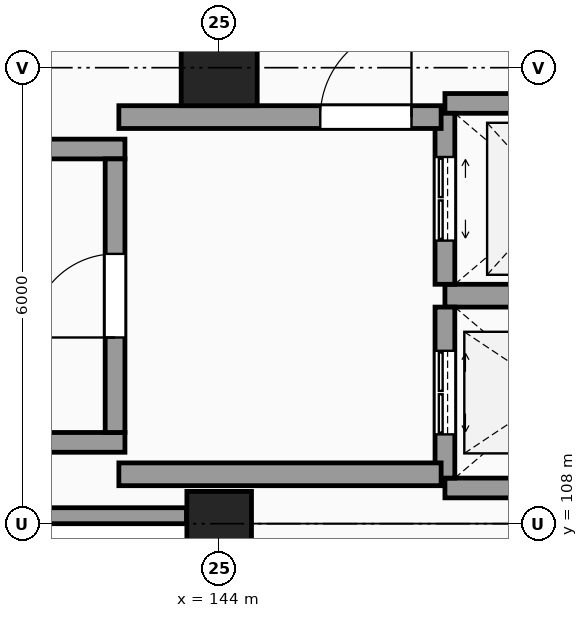
"""IFC4 building model, lengths in metres.
Left out: names, types, materials, properties, quantities, classifications, styles, units other than length and angle.
Written with IfcOpenShell. Run it as: python <this file> out.ifc"""

import sys

from ifc_helpers import new_model, si_unit, direction, frame, frame_2d, origin, origin_2d, place, context, subcontext, project, spatial, rectangle, circle, extrude, element, fill, save


model = new_model("IFC4")
c1 = context("Model", 3, precision=1e-05, world=origin(), true_north=direction((0.0, 1.0)))
c2 = subcontext(c1, "Body", "Model", "MODEL_VIEW")
j1 = project(units=[si_unit("LENGTHUNIT", "METRE"), si_unit("PLANEANGLEUNIT", "RADIAN")], contexts=[c1])
p1 = place(None, origin())
s1 = spatial("IfcSite", under=j1, at=p1, CompositionType="ELEMENT")
p2 = place(p1, origin())
s2 = spatial("IfcBuilding", under=s1, at=p2, CompositionType="ELEMENT")
p3 = place(p2, origin())
s3 = spatial("IfcBuildingStorey", under=s2, at=p3, CompositionType="ELEMENT", Elevation=0.0)
p4 = place(p3, frame((144.0, 108.0, 0.0), z_axis=(0.0, 0.0, 1.0), x_axis=(1.0, 0.0, 0.0)))
e1 = element("IfcColumn", 1, at=p4, inside=s3, PredefinedType="COLUMN", context=c2, shape_type="SweptSolid", body=[
    extrude(circle(Radius=0.425, at=origin_2d()), origin(), (0.0, 0.0, 1.0), 6.0),
])
p5 = place(p3, frame((144.0, 114.0, 0.0), z_axis=(0.0, 0.0, 1.0), x_axis=(1.0, 0.0, 0.0)))
e2 = element("IfcColumn", 2, at=p5, inside=s3, PredefinedType="COLUMN", context=c2, shape_type="SweptSolid", body=[
    extrude(circle(Radius=0.5, at=origin_2d()), origin(), (0.0, 0.0, 1.0), 6.0),
])
p6 = place(p3, frame((138.38, 108.105, 0.0), z_axis=(0.0, 0.0, 1.0), x_axis=(1.0, 0.0, 0.0)))
e3 = element("IfcWall", 3, at=p6, inside=s3, PredefinedType="SOLIDWALL", context=c2, shape_type="SweptSolid", body=[
    extrude(rectangle(XDim=5.19, YDim=0.21, at=frame_2d((2.595, 0.0))), origin(), (0.0, 0.0, 1.0), 4.99),
])
for number, where, z_axis, x_axis in (
    (4, (132.04, 109.07, 0.0), (0.0, 0.0, 1.0), (1.0, 0.0, 0.0)),
    (5, (132.04, 112.93, 0.0), (0.0, 0.0, 1.0), (1.0, 0.0, 0.0)),
):
    element("IfcWall", number, at=place(p3, frame(where, z_axis=z_axis, x_axis=x_axis)), inside=s3, PredefinedType="SHEAR", context=c2, shape_type="SweptSolid", body=[
        extrude(rectangle(XDim=10.72, YDim=0.26, at=frame_2d((5.36, 0.0))), origin(), (0.0, 0.0, 1.0), 6.0),
    ])
p7 = place(p3, frame((142.63, 109.2, 0.0), z_axis=(0.0, 0.0, 1.0), x_axis=(0.0, 1.0, 0.0)))
e6 = element("IfcWall", 6, at=p7, inside=s3, PredefinedType="SHEAR", context=c2, shape_type="SweptSolid", body=[
    extrude(rectangle(XDim=3.6, YDim=0.26, at=frame_2d((1.8, 0.0))), origin(), (0.0, 0.0, 1.0), 6.0),
])
p8 = place(p7, frame((1.25, 0.0, 0.0)))
e7 = element("IfcOpeningElement", 7, at=p8, cuts=e6, PredefinedType="OPENING", context=c2, shape_type="SweptSolid", body=[
    extrude(rectangle(XDim=1.1, YDim=2.15, at=frame_2d((0.55, 1.075))), frame((0.0, 0.14, 0.0), z_axis=(0.0, -1.0, 0.0), x_axis=(1.0, 0.0, 0.0)), (0.0, 0.0, 1.0), 0.28),
])
p9 = place(p3, frame((146.97, 108.47, 0.0), z_axis=(0.0, 0.0, 1.0), x_axis=(1.0, 0.0, 0.0)))
e8 = element("IfcWall", 8, at=p9, inside=s3, PredefinedType="SHEAR", context=c2, shape_type="SweptSolid", body=[
    extrude(rectangle(XDim=2.91, YDim=0.26, at=frame_2d((1.455, 0.0))), origin(), (0.0, 0.0, 1.0), 6.0),
])
p10 = place(p3, frame((146.97, 111.0, 0.0), z_axis=(0.0, 0.0, 1.0), x_axis=(1.0, 0.0, 0.0)))
e9 = element("IfcWall", 9, at=p10, inside=s3, PredefinedType="SHEAR", context=c2, shape_type="SweptSolid", body=[
    extrude(rectangle(XDim=2.91, YDim=0.3, at=frame_2d((1.455, 0.0))), origin(), (0.0, 0.0, 1.0), 6.0),
])
p11 = place(p3, frame((146.97, 108.6, 0.0), z_axis=(0.0, 0.0, 1.0), x_axis=(0.0, 1.0, 0.0)))
e10 = element("IfcWall", 10, at=p11, inside=s3, PredefinedType="SHEAR", context=c2, shape_type="SweptSolid", body=[
    extrude(rectangle(XDim=2.25, YDim=0.26, at=frame_2d((1.125, 0.0))), origin(), (0.0, 0.0, 1.0), 6.0),
])
p12 = place(p11, frame((0.575, 0.0, 0.0)))
e11 = element("IfcOpeningElement", 11, at=p12, cuts=e10, PredefinedType="OPENING", context=c2, shape_type="SweptSolid", body=[
    extrude(rectangle(XDim=1.1, YDim=2.2, at=frame_2d((0.55, 1.1))), frame((0.0, 0.14, 0.0), z_axis=(0.0, -1.0, 0.0), x_axis=(1.0, 0.0, 0.0)), (0.0, 0.0, 1.0), 0.28),
])
p13 = place(p3, frame((146.97, 113.53, 0.0), z_axis=(0.0, 0.0, 1.0), x_axis=(1.0, 0.0, 0.0)))
e12 = element("IfcWall", 12, at=p13, inside=s3, PredefinedType="SHEAR", context=c2, shape_type="SweptSolid", body=[
    extrude(rectangle(XDim=2.91, YDim=0.26, at=frame_2d((1.455, 0.0))), origin(), (0.0, 0.0, 1.0), 6.0),
])
p14 = place(p3, frame((146.97, 111.15, 0.0), z_axis=(0.0, 0.0, 1.0), x_axis=(0.0, 1.0, 0.0)))
e13 = element("IfcWall", 13, at=p14, inside=s3, PredefinedType="SHEAR", context=c2, shape_type="SweptSolid", body=[
    extrude(rectangle(XDim=2.25, YDim=0.26, at=frame_2d((1.125, 0.0))), origin(), (0.0, 0.0, 1.0), 6.0),
])
p15 = place(p14, frame((0.575, 0.0, 0.0)))
e14 = element("IfcOpeningElement", 14, at=p15, cuts=e13, PredefinedType="OPENING", context=c2, shape_type="SweptSolid", body=[
    extrude(rectangle(XDim=1.1, YDim=2.2, at=frame_2d((0.55, 1.1))), frame((0.0, 0.14, 0.0), z_axis=(0.0, -1.0, 0.0), x_axis=(1.0, 0.0, 0.0)), (0.0, 0.0, 1.0), 0.28),
])
p16 = place(p3, frame((142.68, 113.35, 0.0), z_axis=(0.0, 0.0, 1.0), x_axis=(1.0, 0.0, 0.0)))
e15 = element("IfcWall", 15, at=p16, inside=s3, PredefinedType="SHEAR", context=c2, shape_type="SweptSolid", body=[
    extrude(rectangle(XDim=4.24, YDim=0.3, at=frame_2d((2.12, 0.0))), origin(), (0.0, 0.0, 1.0), 6.0),
])
p17 = place(p16, frame((2.65, 0.0, 0.0)))
e16 = element("IfcOpeningElement", 16, at=p17, cuts=e15, PredefinedType="OPENING", context=c2, shape_type="SweptSolid", body=[
    extrude(rectangle(XDim=1.2, YDim=2.2, at=frame_2d((0.6, 1.1))), frame((0.0, 0.16, 0.0), z_axis=(0.0, -1.0, 0.0), x_axis=(1.0, 0.0, 0.0)), (0.0, 0.0, 1.0), 0.32),
])
p18 = place(p3, frame((142.68, 108.65, 0.0), z_axis=(0.0, 0.0, 1.0), x_axis=(1.0, 0.0, 0.0)))
e17 = element("IfcWall", 17, at=p18, inside=s3, PredefinedType="SHEAR", context=c2, shape_type="SweptSolid", body=[
    extrude(rectangle(XDim=4.24, YDim=0.3, at=frame_2d((2.12, 0.0))), origin(), (0.0, 0.0, 1.0), 6.0),
])
p19 = place(p8, origin())
e18 = element("IfcDoor", 18, at=p19, inside=s3, OperationType="SINGLE_SWING_LEFT", PredefinedType="DOOR", context=c2, shape_type="SweptSolid", body=[
    extrude(rectangle(XDim=1.1, YDim=2.15, at=frame_2d((0.55, 1.075))), frame((0.0, 0.025, 0.0), z_axis=(0.0, -1.0, 0.0), x_axis=(1.0, 0.0, 0.0)), (0.0, 0.0, 1.0), 0.05),
])
fill(e7, e18)
p20 = place(p12, origin())
e19 = element("IfcDoor", 19, at=p20, inside=s3, OperationType="DOUBLE_DOOR_SLIDING", PredefinedType="DOOR", context=c2, shape_type="SweptSolid", body=[
    extrude(rectangle(XDim=1.1, YDim=2.2, at=frame_2d((0.55, 1.1))), frame((0.0, 0.025, 0.0), z_axis=(0.0, -1.0, 0.0), x_axis=(1.0, 0.0, 0.0)), (0.0, 0.0, 1.0), 0.05),
])
fill(e11, e19)
p21 = place(p15, origin())
e20 = element("IfcDoor", 20, at=p21, inside=s3, OperationType="DOUBLE_DOOR_SLIDING", PredefinedType="DOOR", context=c2, shape_type="SweptSolid", body=[
    extrude(rectangle(XDim=1.1, YDim=2.2, at=frame_2d((0.55, 1.1))), frame((0.0, 0.025, 0.0), z_axis=(0.0, -1.0, 0.0), x_axis=(1.0, 0.0, 0.0)), (0.0, 0.0, 1.0), 0.05),
])
fill(e14, e20)
p22 = place(p17, origin())
e21 = element("IfcDoor", 21, at=p22, inside=s3, OperationType="SINGLE_SWING_RIGHT", PredefinedType="DOOR", context=c2, shape_type="SweptSolid", body=[
    extrude(rectangle(XDim=1.2, YDim=2.2, at=frame_2d((0.6, 1.1))), frame((0.0, 0.025, 0.0), z_axis=(0.0, -1.0, 0.0), x_axis=(1.0, 0.0, 0.0)), (0.0, 0.0, 1.0), 0.05),
])
fill(e16, e21)
save(model, sys.argv[1])
